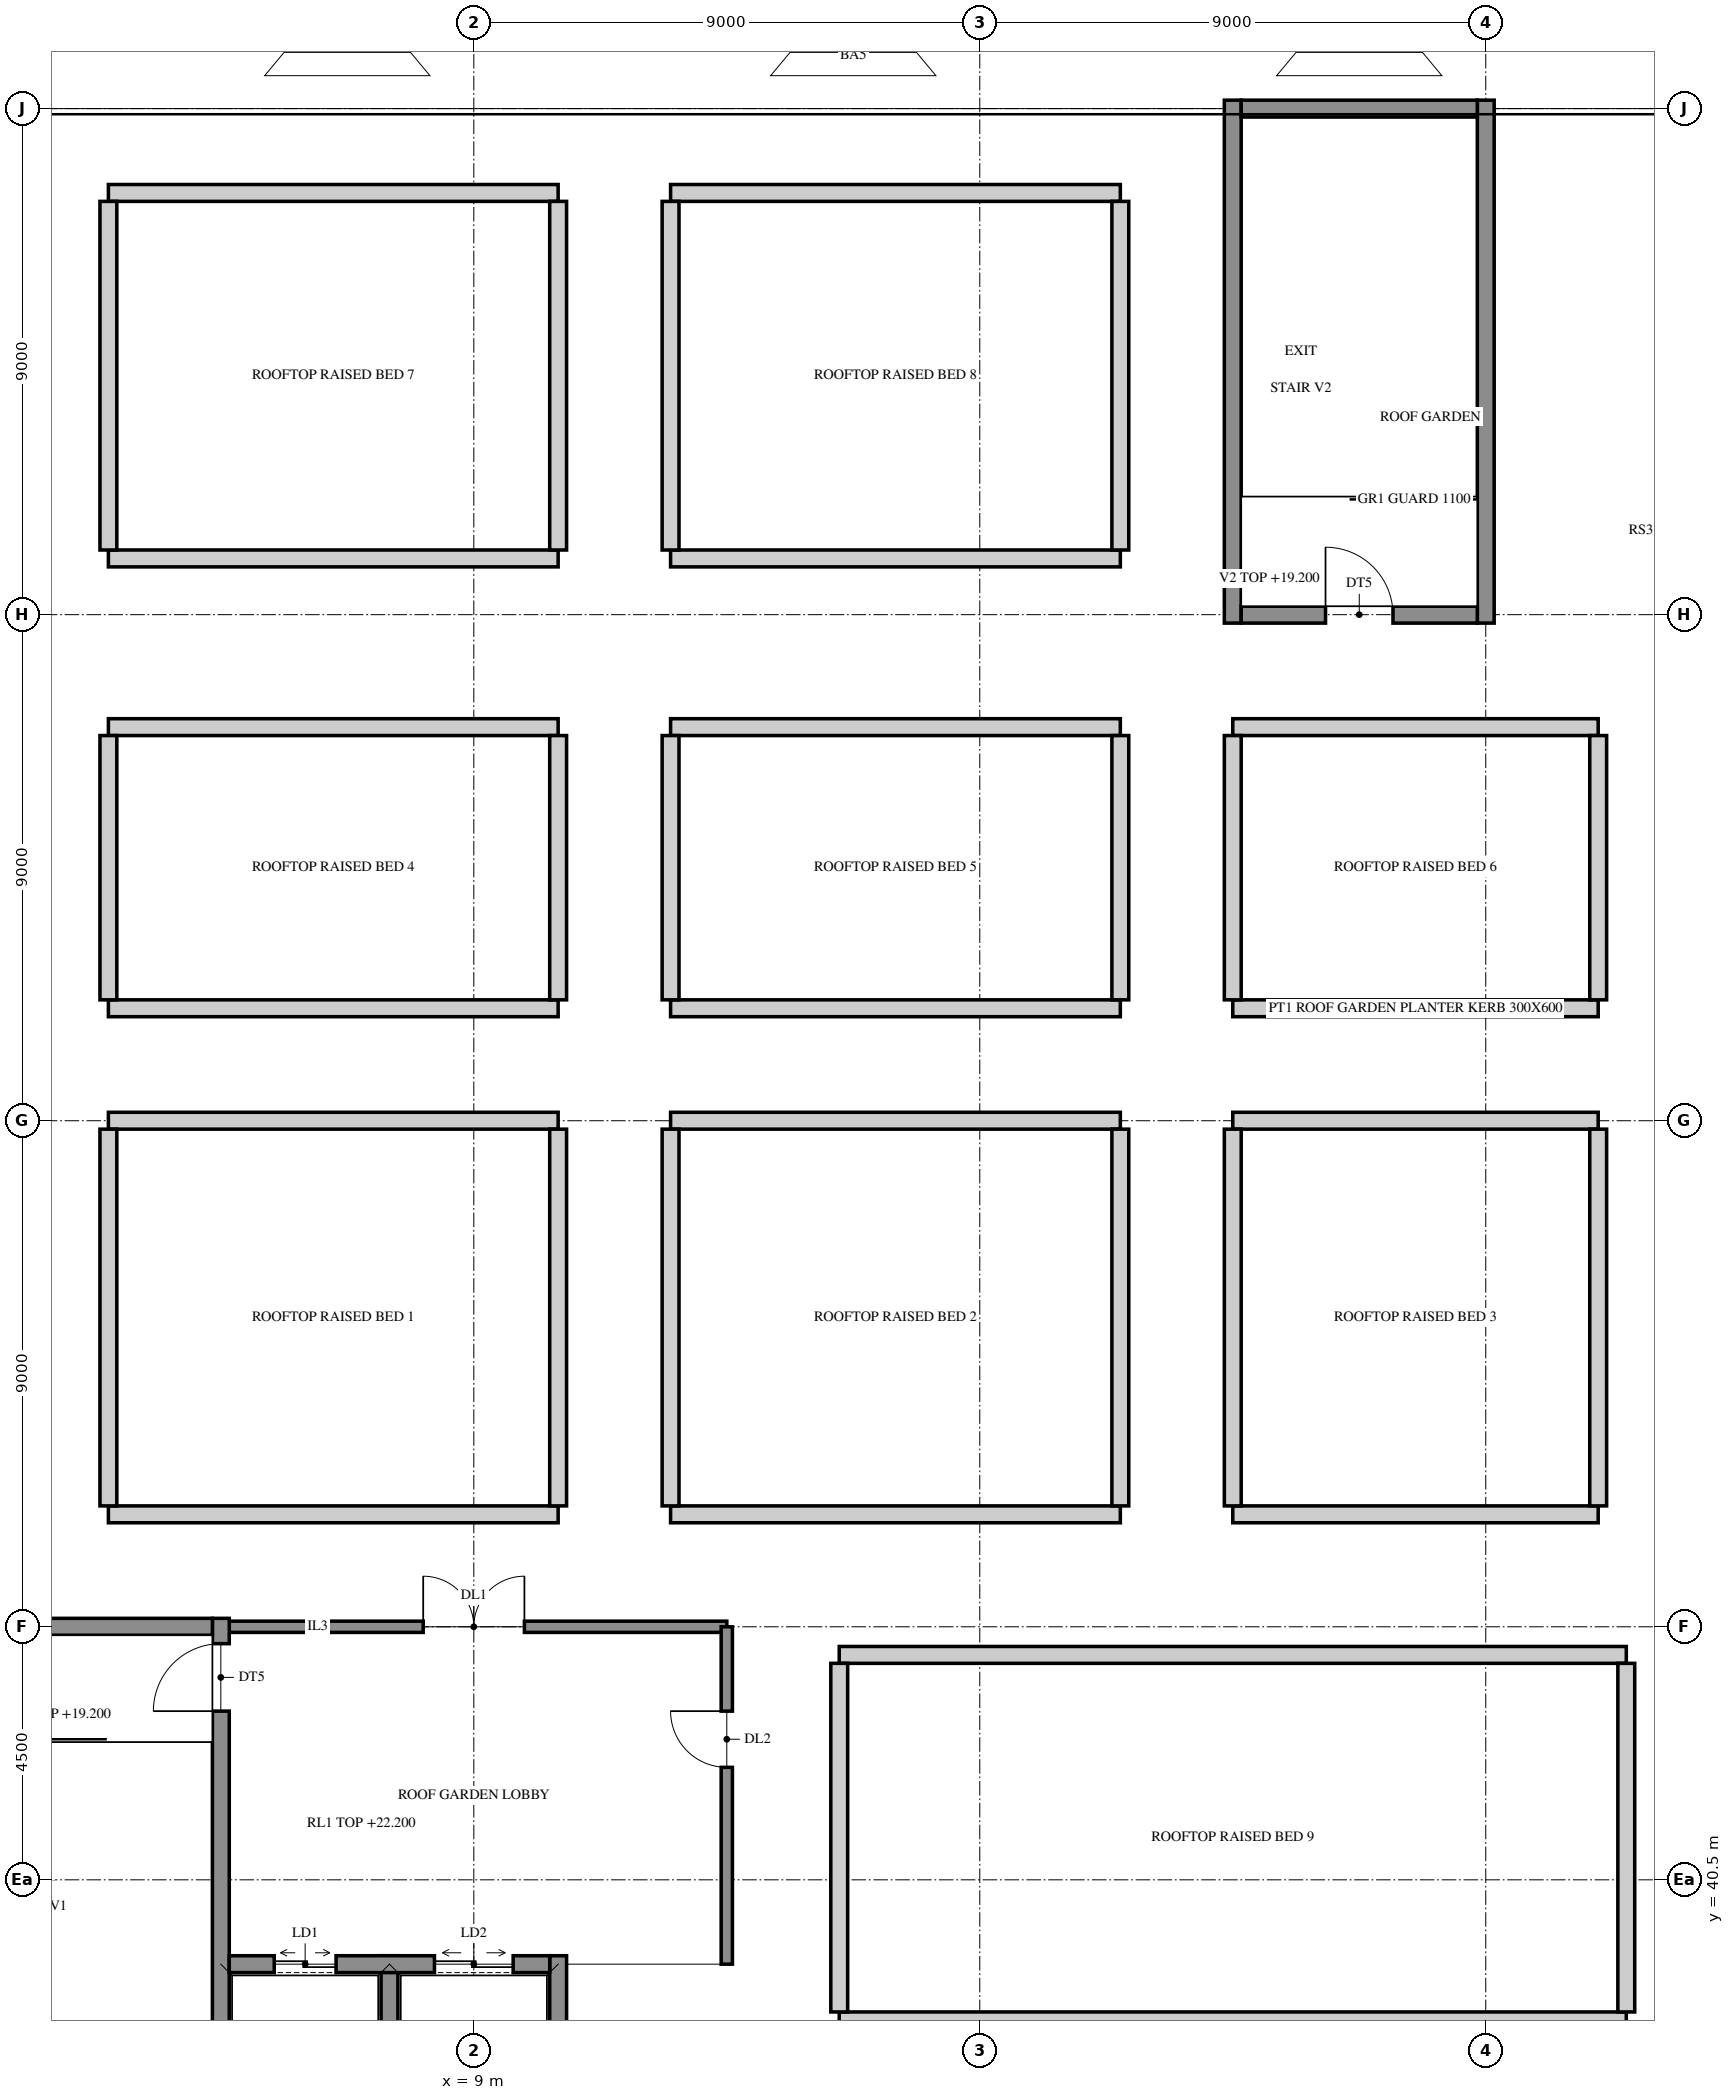
"""IFC4 building model, lengths in metres.
Left out: names, types, materials, properties, quantities, classifications, styles, units other than length and angle.
Written with IfcOpenShell. Run it as: python <this file> out.ifc"""

import sys

from ifc_helpers import new_model, si_unit, direction, frame, frame_2d, origin, place, context, subcontext, project, spatial, rectangle, extrude, element, fill, save


model = new_model("IFC4")
c1 = context("Model", 3, precision=1e-05, world=origin(), true_north=direction((0.0, 1.0)))
c2 = subcontext(c1, "Body", "Model", "MODEL_VIEW")
j1 = project(units=[si_unit("LENGTHUNIT", "METRE"), si_unit("PLANEANGLEUNIT", "RADIAN")], contexts=[c1])
p1 = place(None, origin())
s1 = spatial("IfcSite", under=j1, at=p1, CompositionType="ELEMENT")
p2 = place(p1, origin())
s2 = spatial("IfcBuilding", under=s1, at=p2, CompositionType="ELEMENT")
p3 = place(p2, frame((0.0, 0.0, 19.2)))
s3 = spatial("IfcBuildingStorey", under=s2, at=p3, CompositionType="ELEMENT", Elevation=19.2)
p4 = place(p3, frame((4.5, 45.0, 0.0), z_axis=(0.0, 0.0, 1.0), x_axis=(1.0, 0.0, 0.0)))
e1 = element("IfcWall", 1, at=p4, inside=s3, PredefinedType="STANDARD", context=c2, shape_type="SweptSolid", body=[
    extrude(rectangle(XDim=9.0, YDim=0.2, at=frame_2d((4.5, 0.0))), origin(), (0.0, 0.0, 1.0), 2.8),
])
p5 = place(p4, frame((3.6, 0.0, 0.0)))
e2 = element("IfcOpeningElement", 2, at=p5, cuts=e1, PredefinedType="OPENING", context=c2, shape_type="SweptSolid", body=[
    extrude(rectangle(XDim=1.8, YDim=2.1, at=frame_2d((0.9, 1.05))), frame((0.0, 0.11, 0.0), z_axis=(0.0, -1.0, 0.0), x_axis=(1.0, 0.0, 0.0)), (0.0, 0.0, 1.0), 0.22),
])
p6 = place(p3, frame((13.5, 39.0, 0.0), z_axis=(0.0, 0.0, 1.0), x_axis=(0.0, 1.0, 0.0)))
e3 = element("IfcWall", 3, at=p6, inside=s3, PredefinedType="STANDARD", context=c2, shape_type="SweptSolid", body=[
    extrude(rectangle(XDim=6.0, YDim=0.2, at=frame_2d((3.0, 0.0))), origin(), (0.0, 0.0, 1.0), 2.8),
])
p7 = place(p6, frame((3.5, 0.0, 0.0)))
e4 = element("IfcOpeningElement", 4, at=p7, cuts=e3, PredefinedType="OPENING", context=c2, shape_type="SweptSolid", body=[
    extrude(rectangle(XDim=1.0, YDim=2.1, at=frame_2d((0.5, 1.05))), frame((0.0, 0.11, 0.0), z_axis=(0.0, -1.0, 0.0), x_axis=(1.0, 0.0, 0.0)), (0.0, 0.0, 1.0), 0.22),
])
for number, where, z_axis, x_axis in (
    (5, (2.5, 47.0, 0.0), (0.0, 0.0, 1.0), (1.0, 0.0, 0.0)),
    (6, (2.5, 54.0, 0.0), (0.0, 0.0, 1.0), (1.0, 0.0, 0.0)),
):
    element("IfcWall", number, at=place(p3, frame(where, z_axis=z_axis, x_axis=x_axis)), inside=s3, PredefinedType="STANDARD", context=c2, shape_type="SweptSolid", body=[
        extrude(rectangle(XDim=8.0, YDim=0.3, at=frame_2d((4.0, 0.0))), origin(), (0.0, 0.0, 1.0), 0.6),
    ])
for number, where, z_axis, x_axis in (
    (7, (2.5, 47.15, 0.0), (0.0, 0.0, 1.0), (0.0, 1.0, 0.0)),
    (8, (10.5, 47.15, 0.0), (0.0, 0.0, 1.0), (0.0, 1.0, 0.0)),
):
    element("IfcWall", number, at=place(p3, frame(where, z_axis=z_axis, x_axis=x_axis)), inside=s3, PredefinedType="STANDARD", context=c2, shape_type="SweptSolid", body=[
        extrude(rectangle(XDim=6.7, YDim=0.3, at=frame_2d((3.35, 0.0))), origin(), (0.0, 0.0, 1.0), 0.6),
    ])
for number, where, z_axis, x_axis in (
    (9, (12.5, 47.0, 0.0), (0.0, 0.0, 1.0), (1.0, 0.0, 0.0)),
    (10, (12.5, 54.0, 0.0), (0.0, 0.0, 1.0), (1.0, 0.0, 0.0)),
):
    element("IfcWall", number, at=place(p3, frame(where, z_axis=z_axis, x_axis=x_axis)), inside=s3, PredefinedType="STANDARD", context=c2, shape_type="SweptSolid", body=[
        extrude(rectangle(XDim=8.0, YDim=0.3, at=frame_2d((4.0, 0.0))), origin(), (0.0, 0.0, 1.0), 0.6),
    ])
for number, where, z_axis, x_axis in (
    (11, (12.5, 47.15, 0.0), (0.0, 0.0, 1.0), (0.0, 1.0, 0.0)),
    (12, (20.5, 47.15, 0.0), (0.0, 0.0, 1.0), (0.0, 1.0, 0.0)),
):
    element("IfcWall", number, at=place(p3, frame(where, z_axis=z_axis, x_axis=x_axis)), inside=s3, PredefinedType="STANDARD", context=c2, shape_type="SweptSolid", body=[
        extrude(rectangle(XDim=6.7, YDim=0.3, at=frame_2d((3.35, 0.0))), origin(), (0.0, 0.0, 1.0), 0.6),
    ])
for number, where, z_axis, x_axis in (
    (13, (22.5, 47.0, 0.0), (0.0, 0.0, 1.0), (1.0, 0.0, 0.0)),
    (14, (22.5, 54.0, 0.0), (0.0, 0.0, 1.0), (1.0, 0.0, 0.0)),
):
    element("IfcWall", number, at=place(p3, frame(where, z_axis=z_axis, x_axis=x_axis)), inside=s3, PredefinedType="STANDARD", context=c2, shape_type="SweptSolid", body=[
        extrude(rectangle(XDim=6.5, YDim=0.3, at=frame_2d((3.25, 0.0))), origin(), (0.0, 0.0, 1.0), 0.6),
    ])
for number, where, z_axis, x_axis in (
    (15, (22.5, 47.15, 0.0), (0.0, 0.0, 1.0), (0.0, 1.0, 0.0)),
    (16, (29.0, 47.15, 0.0), (0.0, 0.0, 1.0), (0.0, 1.0, 0.0)),
):
    element("IfcWall", number, at=place(p3, frame(where, z_axis=z_axis, x_axis=x_axis)), inside=s3, PredefinedType="STANDARD", context=c2, shape_type="SweptSolid", body=[
        extrude(rectangle(XDim=6.7, YDim=0.3, at=frame_2d((3.35, 0.0))), origin(), (0.0, 0.0, 1.0), 0.6),
    ])
for number, where, z_axis, x_axis in (
    (17, (2.5, 56.0, 0.0), (0.0, 0.0, 1.0), (1.0, 0.0, 0.0)),
    (18, (2.5, 61.0, 0.0), (0.0, 0.0, 1.0), (1.0, 0.0, 0.0)),
):
    element("IfcWall", number, at=place(p3, frame(where, z_axis=z_axis, x_axis=x_axis)), inside=s3, PredefinedType="STANDARD", context=c2, shape_type="SweptSolid", body=[
        extrude(rectangle(XDim=8.0, YDim=0.3, at=frame_2d((4.0, 0.0))), origin(), (0.0, 0.0, 1.0), 0.6),
    ])
for number, where, z_axis, x_axis in (
    (19, (2.5, 56.15, 0.0), (0.0, 0.0, 1.0), (0.0, 1.0, 0.0)),
    (20, (10.5, 56.15, 0.0), (0.0, 0.0, 1.0), (0.0, 1.0, 0.0)),
):
    element("IfcWall", number, at=place(p3, frame(where, z_axis=z_axis, x_axis=x_axis)), inside=s3, PredefinedType="STANDARD", context=c2, shape_type="SweptSolid", body=[
        extrude(rectangle(XDim=4.7, YDim=0.3, at=frame_2d((2.35, 0.0))), origin(), (0.0, 0.0, 1.0), 0.6),
    ])
for number, where, z_axis, x_axis in (
    (21, (12.5, 56.0, 0.0), (0.0, 0.0, 1.0), (1.0, 0.0, 0.0)),
    (22, (12.5, 61.0, 0.0), (0.0, 0.0, 1.0), (1.0, 0.0, 0.0)),
):
    element("IfcWall", number, at=place(p3, frame(where, z_axis=z_axis, x_axis=x_axis)), inside=s3, PredefinedType="STANDARD", context=c2, shape_type="SweptSolid", body=[
        extrude(rectangle(XDim=8.0, YDim=0.3, at=frame_2d((4.0, 0.0))), origin(), (0.0, 0.0, 1.0), 0.6),
    ])
for number, where, z_axis, x_axis in (
    (23, (12.5, 56.15, 0.0), (0.0, 0.0, 1.0), (0.0, 1.0, 0.0)),
    (24, (20.5, 56.15, 0.0), (0.0, 0.0, 1.0), (0.0, 1.0, 0.0)),
):
    element("IfcWall", number, at=place(p3, frame(where, z_axis=z_axis, x_axis=x_axis)), inside=s3, PredefinedType="STANDARD", context=c2, shape_type="SweptSolid", body=[
        extrude(rectangle(XDim=4.7, YDim=0.3, at=frame_2d((2.35, 0.0))), origin(), (0.0, 0.0, 1.0), 0.6),
    ])
for number, where, z_axis, x_axis in (
    (25, (22.5, 56.0, 0.0), (0.0, 0.0, 1.0), (1.0, 0.0, 0.0)),
    (26, (22.5, 61.0, 0.0), (0.0, 0.0, 1.0), (1.0, 0.0, 0.0)),
):
    element("IfcWall", number, at=place(p3, frame(where, z_axis=z_axis, x_axis=x_axis)), inside=s3, PredefinedType="STANDARD", context=c2, shape_type="SweptSolid", body=[
        extrude(rectangle(XDim=6.5, YDim=0.3, at=frame_2d((3.25, 0.0))), origin(), (0.0, 0.0, 1.0), 0.6),
    ])
for number, where, z_axis, x_axis in (
    (27, (22.5, 56.15, 0.0), (0.0, 0.0, 1.0), (0.0, 1.0, 0.0)),
    (28, (29.0, 56.15, 0.0), (0.0, 0.0, 1.0), (0.0, 1.0, 0.0)),
):
    element("IfcWall", number, at=place(p3, frame(where, z_axis=z_axis, x_axis=x_axis)), inside=s3, PredefinedType="STANDARD", context=c2, shape_type="SweptSolid", body=[
        extrude(rectangle(XDim=4.7, YDim=0.3, at=frame_2d((2.35, 0.0))), origin(), (0.0, 0.0, 1.0), 0.6),
    ])
for number, where, z_axis, x_axis in (
    (29, (2.5, 64.0, 0.0), (0.0, 0.0, 1.0), (1.0, 0.0, 0.0)),
    (30, (2.5, 70.5, 0.0), (0.0, 0.0, 1.0), (1.0, 0.0, 0.0)),
):
    element("IfcWall", number, at=place(p3, frame(where, z_axis=z_axis, x_axis=x_axis)), inside=s3, PredefinedType="STANDARD", context=c2, shape_type="SweptSolid", body=[
        extrude(rectangle(XDim=8.0, YDim=0.3, at=frame_2d((4.0, 0.0))), origin(), (0.0, 0.0, 1.0), 0.6),
    ])
for number, where, z_axis, x_axis in (
    (31, (2.5, 64.15, 0.0), (0.0, 0.0, 1.0), (0.0, 1.0, 0.0)),
    (32, (10.5, 64.15, 0.0), (0.0, 0.0, 1.0), (0.0, 1.0, 0.0)),
):
    element("IfcWall", number, at=place(p3, frame(where, z_axis=z_axis, x_axis=x_axis)), inside=s3, PredefinedType="STANDARD", context=c2, shape_type="SweptSolid", body=[
        extrude(rectangle(XDim=6.2, YDim=0.3, at=frame_2d((3.1, 0.0))), origin(), (0.0, 0.0, 1.0), 0.6),
    ])
for number, where, z_axis, x_axis in (
    (33, (12.5, 64.0, 0.0), (0.0, 0.0, 1.0), (1.0, 0.0, 0.0)),
    (34, (12.5, 70.5, 0.0), (0.0, 0.0, 1.0), (1.0, 0.0, 0.0)),
):
    element("IfcWall", number, at=place(p3, frame(where, z_axis=z_axis, x_axis=x_axis)), inside=s3, PredefinedType="STANDARD", context=c2, shape_type="SweptSolid", body=[
        extrude(rectangle(XDim=8.0, YDim=0.3, at=frame_2d((4.0, 0.0))), origin(), (0.0, 0.0, 1.0), 0.6),
    ])
for number, where, z_axis, x_axis in (
    (35, (12.5, 64.15, 0.0), (0.0, 0.0, 1.0), (0.0, 1.0, 0.0)),
    (36, (20.5, 64.15, 0.0), (0.0, 0.0, 1.0), (0.0, 1.0, 0.0)),
):
    element("IfcWall", number, at=place(p3, frame(where, z_axis=z_axis, x_axis=x_axis)), inside=s3, PredefinedType="STANDARD", context=c2, shape_type="SweptSolid", body=[
        extrude(rectangle(XDim=6.2, YDim=0.3, at=frame_2d((3.1, 0.0))), origin(), (0.0, 0.0, 1.0), 0.6),
    ])
for number, where, z_axis, x_axis in (
    (37, (15.5, 38.0, 0.0), (0.0, 0.0, 1.0), (1.0, 0.0, 0.0)),
    (38, (15.5, 44.5, 0.0), (0.0, 0.0, 1.0), (1.0, 0.0, 0.0)),
):
    element("IfcWall", number, at=place(p3, frame(where, z_axis=z_axis, x_axis=x_axis)), inside=s3, PredefinedType="STANDARD", context=c2, shape_type="SweptSolid", body=[
        extrude(rectangle(XDim=14.0, YDim=0.3, at=frame_2d((7.0, 0.0))), origin(), (0.0, 0.0, 1.0), 0.6),
    ])
for number, where, z_axis, x_axis in (
    (39, (15.5, 38.15, 0.0), (0.0, 0.0, 1.0), (0.0, 1.0, 0.0)),
    (40, (29.5, 38.15, 0.0), (0.0, 0.0, 1.0), (0.0, 1.0, 0.0)),
):
    element("IfcWall", number, at=place(p3, frame(where, z_axis=z_axis, x_axis=x_axis)), inside=s3, PredefinedType="STANDARD", context=c2, shape_type="SweptSolid", body=[
        extrude(rectangle(XDim=6.2, YDim=0.3, at=frame_2d((3.1, 0.0))), origin(), (0.0, 0.0, 1.0), 0.6),
    ])
p8 = place(p3, frame((4.5, 35.85, 0.0), z_axis=(0.0, 0.0, 1.0), x_axis=(0.0, 1.0, 0.0)))
e41 = element("IfcWall", 41, at=p8, inside=s3, PredefinedType="SOLIDWALL", context=c2, shape_type="SweptSolid", body=[
    extrude(rectangle(XDim=9.3, YDim=0.3, at=frame_2d((4.65, 0.0))), origin(), (0.0, 0.0, 1.0), 4.5),
])
p9 = place(p8, frame((7.65, 0.0, 0.0)))
e42 = element("IfcOpeningElement", 42, at=p9, cuts=e41, PredefinedType="OPENING", context=c2, shape_type="SweptSolid", body=[
    extrude(rectangle(XDim=1.2, YDim=2.1, at=frame_2d((0.6, 1.05))), frame((0.0, 0.16, 0.0), z_axis=(0.0, -1.0, 0.0), x_axis=(1.0, 0.0, 0.0)), (0.0, 0.0, 1.0), 0.32),
])
for number, where, z_axis, x_axis in (
    (43, (7.5, 35.85, 0.0), (0.0, 0.0, 1.0), (0.0, 1.0, 0.0)),
    (44, (10.5, 35.85, 0.0), (0.0, 0.0, 1.0), (0.0, 1.0, 0.0)),
):
    element("IfcWall", number, at=place(p3, frame(where, z_axis=z_axis, x_axis=x_axis)), inside=s3, PredefinedType="SOLIDWALL", context=c2, shape_type="SweptSolid", body=[
        extrude(rectangle(XDim=3.3, YDim=0.3, at=frame_2d((1.65, 0.0))), origin(), (0.0, 0.0, 1.0), 4.5),
    ])
p10 = place(p3, frame((4.65, 39.0, 0.0), z_axis=(0.0, 0.0, 1.0), x_axis=(1.0, 0.0, 0.0)))
e45 = element("IfcWall", 45, at=p10, inside=s3, PredefinedType="SOLIDWALL", context=c2, shape_type="SweptSolid", body=[
    extrude(rectangle(XDim=5.7, YDim=0.3, at=frame_2d((2.85, 0.0))), origin(), (0.0, 0.0, 1.0), 4.5),
])
p11 = place(p10, frame((0.8, 0.0, 0.0)))
e46 = element("IfcOpeningElement", 46, at=p11, cuts=e45, PredefinedType="OPENING", context=c2, shape_type="SweptSolid", body=[
    extrude(rectangle(XDim=1.1, YDim=2.1, at=frame_2d((0.55, 1.05))), frame((0.0, 0.16, 0.0), z_axis=(0.0, -1.0, 0.0), x_axis=(1.0, 0.0, 0.0)), (0.0, 0.0, 1.0), 0.32),
])
p12 = place(p10, frame((3.65, 0.0, 0.0)))
e47 = element("IfcOpeningElement", 47, at=p12, cuts=e45, PredefinedType="OPENING", context=c2, shape_type="SweptSolid", body=[
    extrude(rectangle(XDim=1.4, YDim=2.1, at=frame_2d((0.7, 1.05))), frame((0.0, 0.16, 0.0), z_axis=(0.0, -1.0, 0.0), x_axis=(1.0, 0.0, 0.0)), (0.0, 0.0, 1.0), 0.32),
])
p13 = place(p3, frame((0.15, 45.0, 0.0), z_axis=(0.0, 0.0, 1.0), x_axis=(1.0, 0.0, 0.0)))
e48 = element("IfcWall", 48, at=p13, inside=s3, PredefinedType="SOLIDWALL", context=c2, shape_type="SweptSolid", body=[
    extrude(rectangle(XDim=4.2, YDim=0.3, at=frame_2d((2.1, 0.0))), origin(), (0.0, 0.0, 1.0), 4.5),
])
for number, where, z_axis, x_axis in (
    (49, (22.5, 62.85, 0.0), (0.0, 0.0, 1.0), (0.0, 1.0, 0.0)),
    (50, (27.0, 62.85, 0.0), (0.0, 0.0, 1.0), (0.0, 1.0, 0.0)),
):
    element("IfcWall", number, at=place(p3, frame(where, z_axis=z_axis, x_axis=x_axis)), inside=s3, PredefinedType="SOLIDWALL", context=c2, shape_type="SweptSolid", body=[
        extrude(rectangle(XDim=9.3, YDim=0.3, at=frame_2d((4.65, 0.0))), origin(), (0.0, 0.0, 1.0), 4.5),
    ])
p14 = place(p3, frame((22.65, 63.0, 0.0), z_axis=(0.0, 0.0, 1.0), x_axis=(1.0, 0.0, 0.0)))
e51 = element("IfcWall", 51, at=p14, inside=s3, PredefinedType="SOLIDWALL", context=c2, shape_type="SweptSolid", body=[
    extrude(rectangle(XDim=4.2, YDim=0.3, at=frame_2d((2.1, 0.0))), origin(), (0.0, 0.0, 1.0), 4.5),
])
p15 = place(p14, frame((1.5, 0.0, 0.0)))
e52 = element("IfcOpeningElement", 52, at=p15, cuts=e51, PredefinedType="OPENING", context=c2, shape_type="SweptSolid", body=[
    extrude(rectangle(XDim=1.2, YDim=2.1, at=frame_2d((0.6, 1.05))), frame((0.0, 0.16, 0.0), z_axis=(0.0, -1.0, 0.0), x_axis=(1.0, 0.0, 0.0)), (0.0, 0.0, 1.0), 0.32),
])
p16 = place(p3, frame((22.65, 72.0, 0.0), z_axis=(0.0, 0.0, 1.0), x_axis=(1.0, 0.0, 0.0)))
e53 = element("IfcWall", 53, at=p16, inside=s3, PredefinedType="SOLIDWALL", context=c2, shape_type="SweptSolid", body=[
    extrude(rectangle(XDim=4.2, YDim=0.3, at=frame_2d((2.1, 0.0))), origin(), (0.0, 0.0, 1.0), 4.5),
])
p17 = place(p5, origin())
e54 = element("IfcDoor", 54, at=p17, inside=s3, OperationType="DOUBLE_DOOR_SINGLE_SWING", PredefinedType="DOOR", context=c2, shape_type="SweptSolid", body=[
    extrude(rectangle(XDim=1.8, YDim=2.1, at=frame_2d((0.9, 1.05))), frame((0.0, 0.025, 0.0), z_axis=(0.0, -1.0, 0.0), x_axis=(1.0, 0.0, 0.0)), (0.0, 0.0, 1.0), 0.05),
])
fill(e2, e54)
p18 = place(p7, frame((1.0, 0.0, 0.0), z_axis=(0.0, 0.0, 1.0), x_axis=(-1.0, 0.0, 0.0)))
e55 = element("IfcDoor", 55, at=p18, inside=s3, OperationType="SINGLE_SWING_RIGHT", PredefinedType="DOOR", context=c2, shape_type="SweptSolid", body=[
    extrude(rectangle(XDim=1.0, YDim=2.1, at=frame_2d((0.5, 1.05))), frame((0.0, 0.025, 0.0), z_axis=(0.0, -1.0, 0.0), x_axis=(1.0, 0.0, 0.0)), (0.0, 0.0, 1.0), 0.05),
])
fill(e4, e55)
p19 = place(p9, origin())
e56 = element("IfcDoor", 56, at=p19, inside=s3, OperationType="SINGLE_SWING_LEFT", PredefinedType="DOOR", context=c2, shape_type="SweptSolid", body=[
    extrude(rectangle(XDim=1.2, YDim=2.1, at=frame_2d((0.6, 1.05))), frame((0.0, 0.025, 0.0), z_axis=(0.0, -1.0, 0.0), x_axis=(1.0, 0.0, 0.0)), (0.0, 0.0, 1.0), 0.05),
])
fill(e42, e56)
p20 = place(p15, origin())
e57 = element("IfcDoor", 57, at=p20, inside=s3, OperationType="SINGLE_SWING_LEFT", PredefinedType="DOOR", context=c2, shape_type="SweptSolid", body=[
    extrude(rectangle(XDim=1.2, YDim=2.1, at=frame_2d((0.6, 1.05))), frame((0.0, 0.025, 0.0), z_axis=(0.0, -1.0, 0.0), x_axis=(1.0, 0.0, 0.0)), (0.0, 0.0, 1.0), 0.05),
])
fill(e52, e57)
p21 = place(p11, origin())
e58 = element("IfcDoor", 58, at=p21, inside=s3, OperationType="DOUBLE_DOOR_SLIDING", PredefinedType="DOOR", context=c2, shape_type="SweptSolid", body=[
    extrude(rectangle(XDim=1.1, YDim=2.1, at=frame_2d((0.55, 1.05))), frame((0.0, 0.025, 0.0), z_axis=(0.0, -1.0, 0.0), x_axis=(1.0, 0.0, 0.0)), (0.0, 0.0, 1.0), 0.05),
])
fill(e46, e58)
p22 = place(p12, origin())
e59 = element("IfcDoor", 59, at=p22, inside=s3, OperationType="DOUBLE_DOOR_SLIDING", PredefinedType="DOOR", context=c2, shape_type="SweptSolid", body=[
    extrude(rectangle(XDim=1.4, YDim=2.1, at=frame_2d((0.7, 1.05))), frame((0.0, 0.025, 0.0), z_axis=(0.0, -1.0, 0.0), x_axis=(1.0, 0.0, 0.0)), (0.0, 0.0, 1.0), 0.05),
])
fill(e47, e59)
save(model, sys.argv[1])
